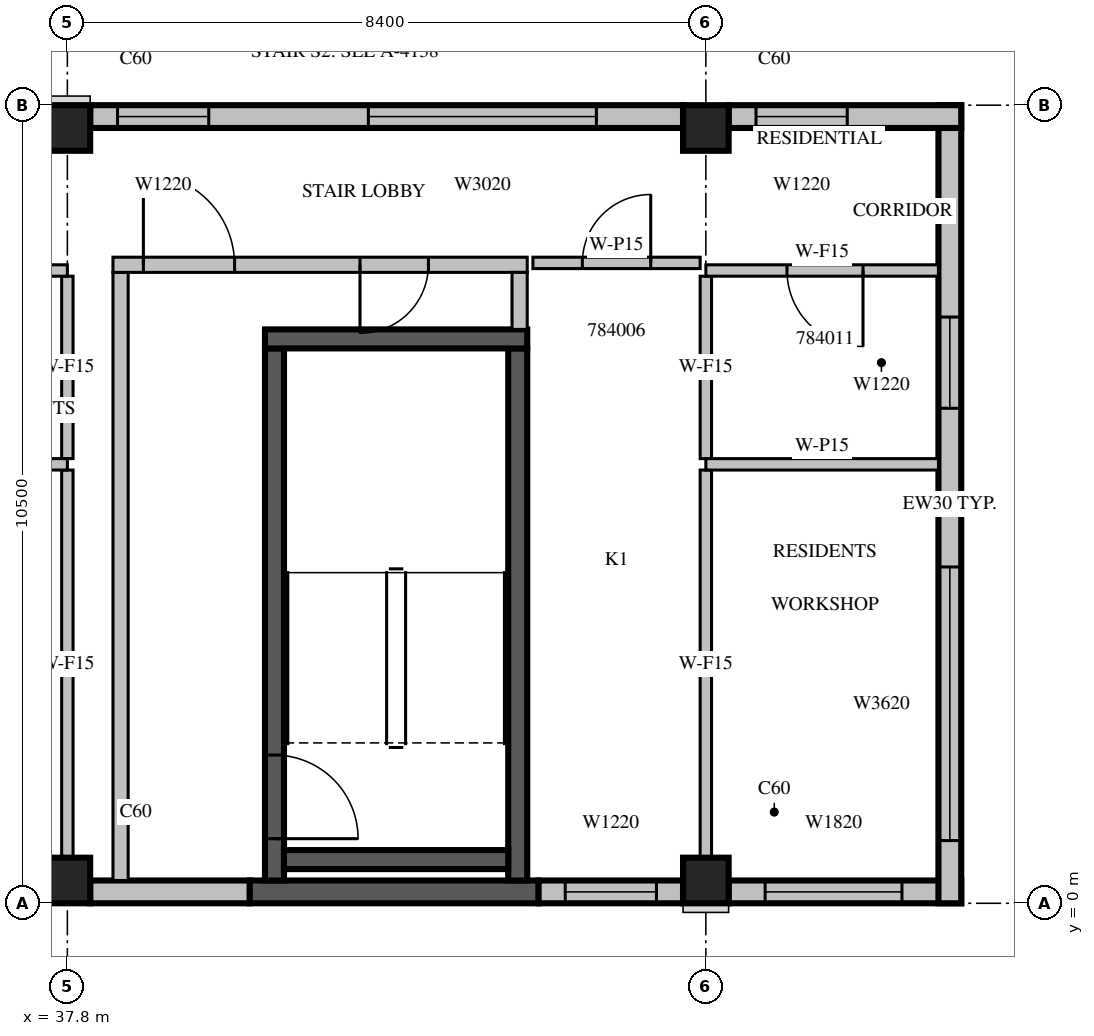
"""IFC4 building model, lengths in metres.
Left out: names, types, materials, properties, quantities, classifications, styles, units other than length and angle.
Written with IfcOpenShell. Run it as: python <this file> out.ifc"""

import sys

from ifc_helpers import new_model, si_unit, direction, frame, frame_2d, origin, origin_2d, place, context, subcontext, project, spatial, rectangle, extrude, source, transform, mapped, element, fill, save


model = new_model("IFC4")
c1 = context("Model", 3, precision=1e-05, world=origin(), true_north=direction((0.0, 1.0)))
c2 = subcontext(c1, "Body", "Model", "MODEL_VIEW")
j1 = project(units=[si_unit("LENGTHUNIT", "METRE"), si_unit("PLANEANGLEUNIT", "RADIAN")], contexts=[c1])
p1 = place(None, origin())
s1 = spatial("IfcSite", under=j1, at=p1, CompositionType="ELEMENT")
p2 = place(p1, origin())
s2 = spatial("IfcBuilding", under=s1, at=p2, CompositionType="ELEMENT")
p3 = place(p2, frame((0.0, 0.0, 354.5)))
s3 = spatial("IfcBuildingStorey", under=s2, at=p3, CompositionType="ELEMENT", Elevation=354.5)
m1 = source(origin(), c2, "Body", "SweptSolid", [
    extrude(rectangle(XDim=0.6, YDim=0.6, at=origin_2d()), origin(), (0.0, 0.0, 1.0), 3.5),
])
for number, where, z_axis, x_axis in (
    (1, (37.8, 0.3, 0.0), (0.0, 0.0, 1.0), (1.0, 0.0, 0.0)),
    (2, (46.2, 0.3, 0.0), (0.0, 0.0, 1.0), (1.0, 0.0, 0.0)),
    (3, (37.8, 10.2, 0.0), (0.0, 0.0, 1.0), (1.0, 0.0, 0.0)),
    (4, (46.2, 10.2, 0.0), (0.0, 0.0, 1.0), (1.0, 0.0, 0.0)),
):
    element("IfcColumn", number, at=place(p3, frame(where, z_axis=z_axis, x_axis=x_axis)), inside=s3, PredefinedType="COLUMN", context=c2, shape_type="MappedRepresentation", body=[
        mapped(m1, transform((0.0, 0.0, 0.0), scale=1.0)),
    ])
m2 = source(origin(), c2, "Body", "SweptSolid", [
    extrude(rectangle(XDim=2.1, YDim=0.3, at=frame_2d((1.05, 0.0))), origin(), (0.0, 0.0, 1.0), 3.1),
])
p4 = place(p3, frame((38.1, 0.15, 0.0), z_axis=(0.0, 0.0, 1.0), x_axis=(1.0, 0.0, 0.0)))
e5 = element("IfcWall", 5, at=p4, inside=s3, PredefinedType="STANDARD", context=c2, shape_type="MappedRepresentation", body=[
    mapped(m2, transform((0.0, 0.0, 0.0), scale=1.0)),
])
m3 = source(origin(), c2, "Body", "SweptSolid", [
    extrude(rectangle(XDim=3.8, YDim=0.3, at=frame_2d((1.9, 0.0))), origin(), (0.0, 0.0, 1.0), 3.1),
])
p5 = place(p3, frame((40.2, 0.15, 0.0), z_axis=(0.0, 0.0, 1.0), x_axis=(1.0, 0.0, 0.0)))
e6 = element("IfcWall", 6, at=p5, inside=s3, PredefinedType="SOLIDWALL", context=c2, shape_type="MappedRepresentation", body=[
    mapped(m3, transform((0.0, 0.0, 0.0), scale=1.0)),
])
m4 = source(origin(), c2, "Body", "SweptSolid", [
    extrude(rectangle(XDim=1.9, YDim=0.3, at=frame_2d((0.95, 0.0))), origin(), (0.0, 0.0, 1.0), 3.1),
])
p6 = place(p3, frame((44.0, 0.15, 0.0), z_axis=(0.0, 0.0, 1.0), x_axis=(1.0, 0.0, 0.0)))
e7 = element("IfcWall", 7, at=p6, inside=s3, PredefinedType="STANDARD", context=c2, shape_type="MappedRepresentation", body=[
    mapped(m4, transform((0.0, 0.0, 0.0), scale=1.0)),
])
m5 = source(origin(), c2, "Body", "SweptSolid", [
    extrude(rectangle(XDim=1.2, YDim=2.0, at=frame_2d((0.6, 1.0))), frame((0.0, 0.16, 0.0), z_axis=(0.0, -1.0, 0.0), x_axis=(1.0, 0.0, 0.0)), (0.0, 0.0, 1.0), 0.32),
])
p7 = place(p6, frame((0.35, 0.0, 0.6)))
e8 = element("IfcOpeningElement", 8, at=p7, cuts=e7, PredefinedType="OPENING", context=c2, shape_type="MappedRepresentation", body=[
    mapped(m5, transform((0.0, 0.0, 0.0), scale=1.0)),
])
m6 = source(origin(), c2, "Body", "SweptSolid", [
    extrude(rectangle(XDim=3.06, YDim=0.3, at=frame_2d((1.53, 0.0))), origin(), (0.0, 0.0, 1.0), 3.1),
])
p8 = place(p3, frame((46.5, 0.15, 0.0), z_axis=(0.0, 0.0, 1.0), x_axis=(1.0, 0.0, 0.0)))
e9 = element("IfcWall", 9, at=p8, inside=s3, PredefinedType="STANDARD", context=c2, shape_type="MappedRepresentation", body=[
    mapped(m6, transform((0.0, 0.0, 0.0), scale=1.0)),
])
m7 = source(origin(), c2, "Body", "SweptSolid", [
    extrude(rectangle(XDim=1.8, YDim=2.0, at=frame_2d((0.9, 1.0))), frame((0.0, 0.16, 0.0), z_axis=(0.0, -1.0, 0.0), x_axis=(1.0, 0.0, 0.0)), (0.0, 0.0, 1.0), 0.32),
])
p9 = place(p8, frame((0.48, 0.0, 0.6)))
e10 = element("IfcOpeningElement", 10, at=p9, cuts=e9, PredefinedType="OPENING", context=c2, shape_type="MappedRepresentation", body=[
    mapped(m7, transform((0.0, 0.0, 0.0), scale=1.0)),
])
m8 = source(origin(), c2, "Body", "SweptSolid", [
    extrude(rectangle(XDim=10.5, YDim=0.3, at=frame_2d((5.25, 0.0))), origin(), (0.0, 0.0, 1.0), 3.1),
])
p10 = place(p3, frame((49.41, 0.0, 0.0), z_axis=(0.0, 0.0, 1.0), x_axis=(0.0, 1.0, 0.0)))
e11 = element("IfcWall", 11, at=p10, inside=s3, PredefinedType="STANDARD", context=c2, shape_type="MappedRepresentation", body=[
    mapped(m8, transform((0.0, 0.0, 0.0), scale=1.0)),
])
m9 = source(origin(), c2, "Body", "SweptSolid", [
    extrude(rectangle(XDim=3.6, YDim=2.0, at=frame_2d((1.8, 1.0))), frame((0.0, 0.16, 0.0), z_axis=(0.0, -1.0, 0.0), x_axis=(1.0, 0.0, 0.0)), (0.0, 0.0, 1.0), 0.32),
])
p11 = place(p10, frame((0.825, 0.0, 0.6)))
e12 = element("IfcOpeningElement", 12, at=p11, cuts=e11, PredefinedType="OPENING", context=c2, shape_type="MappedRepresentation", body=[
    mapped(m9, transform((0.0, 0.0, 0.0), scale=1.0)),
])
p12 = place(p10, frame((6.513, 0.0, 0.6)))
e13 = element("IfcOpeningElement", 13, at=p12, cuts=e11, PredefinedType="OPENING", context=c2, shape_type="MappedRepresentation", body=[
    mapped(m5, transform((0.0, 0.0, 0.0), scale=1.0)),
])
p13 = place(p3, frame((49.56, 10.35, 0.0), z_axis=(0.0, 0.0, 1.0), x_axis=(-1.0, 0.0, 0.0)))
e14 = element("IfcWall", 14, at=p13, inside=s3, PredefinedType="STANDARD", context=c2, shape_type="MappedRepresentation", body=[
    mapped(m6, transform((0.0, 0.0, 0.0), scale=1.0)),
])
p14 = place(p13, frame((1.5, 0.0, 0.6)))
e15 = element("IfcOpeningElement", 15, at=p14, cuts=e14, PredefinedType="OPENING", context=c2, shape_type="MappedRepresentation", body=[
    mapped(m5, transform((0.0, 0.0, 0.0), scale=1.0)),
])
m10 = source(origin(), c2, "Body", "SweptSolid", [
    extrude(rectangle(XDim=7.8, YDim=0.3, at=frame_2d((3.9, 0.0))), origin(), (0.0, 0.0, 1.0), 3.1),
])
p15 = place(p3, frame((45.9, 10.35, 0.0), z_axis=(0.0, 0.0, 1.0), x_axis=(-1.0, 0.0, 0.0)))
e16 = element("IfcWall", 16, at=p15, inside=s3, PredefinedType="STANDARD", context=c2, shape_type="MappedRepresentation", body=[
    mapped(m10, transform((0.0, 0.0, 0.0), scale=1.0)),
])
m11 = source(origin(), c2, "Body", "SweptSolid", [
    extrude(rectangle(XDim=3.0, YDim=2.0, at=frame_2d((1.5, 1.0))), frame((0.0, 0.16, 0.0), z_axis=(0.0, -1.0, 0.0), x_axis=(1.0, 0.0, 0.0)), (0.0, 0.0, 1.0), 0.32),
])
p16 = place(p15, frame((1.14, 0.0, 0.6)))
e17 = element("IfcOpeningElement", 17, at=p16, cuts=e16, PredefinedType="OPENING", context=c2, shape_type="MappedRepresentation", body=[
    mapped(m11, transform((0.0, 0.0, 0.0), scale=1.0)),
])
p17 = place(p15, frame((6.24, 0.0, 0.6)))
e18 = element("IfcOpeningElement", 18, at=p17, cuts=e16, PredefinedType="OPENING", context=c2, shape_type="MappedRepresentation", body=[
    mapped(m5, transform((0.0, 0.0, 0.0), scale=1.0)),
])
m12 = source(origin(), c2, "Body", "SweptSolid", [
    extrude(rectangle(XDim=7.0, YDim=0.25, at=frame_2d((3.5, 0.0))), origin(), (0.0, 0.0, 1.0), 3.1),
])
p18 = place(p3, frame((40.525, 0.3, 0.0), z_axis=(0.0, 0.0, 1.0), x_axis=(0.0, 1.0, 0.0)))
e19 = element("IfcWall", 19, at=p18, inside=s3, PredefinedType="SOLIDWALL", context=c2, shape_type="MappedRepresentation", body=[
    mapped(m12, transform((0.0, 0.0, 0.0), scale=1.0)),
])
m13 = source(origin(), c2, "Body", "SweptSolid", [
    extrude(rectangle(XDim=1.1, YDim=2.1, at=frame_2d((0.55, 1.05))), frame((0.0, 0.135, 0.0), z_axis=(0.0, -1.0, 0.0), x_axis=(1.0, 0.0, 0.0)), (0.0, 0.0, 1.0), 0.27),
])
p19 = place(p18, frame((0.55, 0.0, 0.0)))
e20 = element("IfcOpeningElement", 20, at=p19, cuts=e19, PredefinedType="OPENING", context=c2, shape_type="MappedRepresentation", body=[
    mapped(m13, transform((0.0, 0.0, 0.0), scale=1.0)),
])
p20 = place(p3, frame((43.725, 0.3, 0.0), z_axis=(0.0, 0.0, 1.0), x_axis=(0.0, 1.0, 0.0)))
e21 = element("IfcWall", 21, at=p20, inside=s3, PredefinedType="SOLIDWALL", context=c2, shape_type="MappedRepresentation", body=[
    mapped(m12, transform((0.0, 0.0, 0.0), scale=1.0)),
])
m14 = source(origin(), c2, "Body", "SweptSolid", [
    extrude(rectangle(XDim=3.45, YDim=0.25, at=frame_2d((1.725, 0.0))), origin(), (0.0, 0.0, 1.0), 3.1),
])
p21 = place(p3, frame((40.4, 7.425, 0.0), z_axis=(0.0, 0.0, 1.0), x_axis=(1.0, 0.0, 0.0)))
e22 = element("IfcWall", 22, at=p21, inside=s3, PredefinedType="SOLIDWALL", context=c2, shape_type="MappedRepresentation", body=[
    mapped(m14, transform((0.0, 0.0, 0.0), scale=1.0)),
])
m15 = source(origin(), c2, "Body", "SweptSolid", [
    extrude(rectangle(XDim=2.95, YDim=0.25, at=frame_2d((1.475, 0.0))), origin(), (0.0, 0.0, 1.0), 3.1),
])
p22 = place(p3, frame((40.65, 0.575, 0.0), z_axis=(0.0, 0.0, 1.0), x_axis=(1.0, 0.0, 0.0)))
e23 = element("IfcWall", 23, at=p22, inside=s3, PredefinedType="SOLIDWALL", context=c2, shape_type="MappedRepresentation", body=[
    mapped(m15, transform((0.0, 0.0, 0.0), scale=1.0)),
])
m16 = source(origin(), c2, "Body", "SweptSolid", [
    extrude(rectangle(XDim=8.0, YDim=0.2, at=frame_2d((4.0, 0.0))), origin(), (0.0, 0.0, 1.0), 3.1),
])
p23 = place(p3, frame((38.5, 0.3, 0.0), z_axis=(0.0, 0.0, 1.0), x_axis=(0.0, 1.0, 0.0)))
e24 = element("IfcWall", 24, at=p23, inside=s3, PredefinedType="PARTITIONING", context=c2, shape_type="MappedRepresentation", body=[
    mapped(m16, transform((0.0, 0.0, 0.0), scale=1.0)),
])
m17 = source(origin(), c2, "Body", "SweptSolid", [
    extrude(rectangle(XDim=5.45, YDim=0.2, at=frame_2d((2.725, 0.0))), origin(), (0.0, 0.0, 1.0), 3.1),
])
p24 = place(p3, frame((38.4, 8.4, 0.0), z_axis=(0.0, 0.0, 1.0), x_axis=(1.0, 0.0, 0.0)))
e25 = element("IfcWall", 25, at=p24, inside=s3, PredefinedType="PARTITIONING", context=c2, shape_type="MappedRepresentation", body=[
    mapped(m17, transform((0.0, 0.0, 0.0), scale=1.0)),
])
m18 = source(origin(), c2, "Body", "SweptSolid", [
    extrude(rectangle(XDim=1.2, YDim=2.1, at=frame_2d((0.6, 1.05))), frame((0.0, 0.11, 0.0), z_axis=(0.0, -1.0, 0.0), x_axis=(1.0, 0.0, 0.0)), (0.0, 0.0, 1.0), 0.22),
])
p25 = place(p24, frame((0.4, 0.0, 0.0)))
e26 = element("IfcOpeningElement", 26, at=p25, cuts=e25, PredefinedType="OPENING", context=c2, shape_type="MappedRepresentation", body=[
    mapped(m18, transform((0.0, 0.0, 0.0), scale=1.0)),
])
m19 = source(origin(), c2, "Body", "SweptSolid", [
    extrude(rectangle(XDim=0.9, YDim=2.1, at=frame_2d((0.45, 1.05))), frame((0.0, 0.11, 0.0), z_axis=(0.0, -1.0, 0.0), x_axis=(1.0, 0.0, 0.0)), (0.0, 0.0, 1.0), 0.22),
])
p26 = place(p24, frame((3.25, 0.0, 0.0)))
e27 = element("IfcOpeningElement", 27, at=p26, cuts=e25, PredefinedType="OPENING", context=c2, shape_type="MappedRepresentation", body=[
    mapped(m19, transform((0.0, 0.0, 0.0), scale=1.0)),
])
m20 = source(origin(), c2, "Body", "SweptSolid", [
    extrude(rectangle(XDim=0.75, YDim=0.2, at=frame_2d((0.375, 0.0))), origin(), (0.0, 0.0, 1.0), 3.1),
])
p27 = place(p3, frame((43.75, 7.55, 0.0), z_axis=(0.0, 0.0, 1.0), x_axis=(0.0, 1.0, 0.0)))
e28 = element("IfcWall", 28, at=p27, inside=s3, PredefinedType="PARTITIONING", context=c2, shape_type="MappedRepresentation", body=[
    mapped(m20, transform((0.0, 0.0, 0.0), scale=1.0)),
])
m21 = source(origin(), c2, "Body", "SweptSolid", [
    extrude(rectangle(XDim=2.2, YDim=0.15, at=frame_2d((1.1, 0.0))), origin(), (0.0, 0.0, 1.0), 3.1),
])
p28 = place(p3, frame((46.125, 8.425, 0.0), z_axis=(0.0, 0.0, 1.0), x_axis=(-1.0, 0.0, 0.0)))
e29 = element("IfcWall", 29, at=p28, inside=s3, PredefinedType="PARTITIONING", context=c2, shape_type="MappedRepresentation", body=[
    mapped(m21, transform((0.0, 0.0, 0.0), scale=1.0)),
])
m22 = source(origin(), c2, "Body", "SweptSolid", [
    extrude(rectangle(XDim=0.9, YDim=2.1, at=frame_2d((0.45, 1.05))), frame((0.0, 0.085, 0.0), z_axis=(0.0, -1.0, 0.0), x_axis=(1.0, 0.0, 0.0)), (0.0, 0.0, 1.0), 0.17),
])
p29 = place(p28, frame((0.65, 0.0, 0.0)))
e30 = element("IfcOpeningElement", 30, at=p29, cuts=e29, PredefinedType="OPENING", context=c2, shape_type="MappedRepresentation", body=[
    mapped(m22, transform((0.0, 0.0, 0.0), scale=1.0)),
])
p30 = place(p3, frame((37.8, 0.599, 0.0), z_axis=(0.0, 0.0, 1.0), x_axis=(0.0, 1.0, 0.0)))
e31 = element("IfcWall", 31, at=p30, inside=s3, PredefinedType="PARTITIONING", context=c2, shape_type="SweptSolid", body=[
    extrude(rectangle(XDim=5.101, YDim=0.15, at=frame_2d((2.55, 0.0))), origin(), (0.0, 0.0, 1.0), 3.1),
])
m23 = source(origin(), c2, "Body", "SweptSolid", [
    extrude(rectangle(XDim=2.4, YDim=0.15, at=frame_2d((1.2, 0.0))), origin(), (0.0, 0.0, 1.0), 3.1),
])
p31 = place(p3, frame((37.8, 5.85, 0.0), z_axis=(0.0, 0.0, 1.0), x_axis=(0.0, 1.0, 0.0)))
e32 = element("IfcWall", 32, at=p31, inside=s3, PredefinedType="PARTITIONING", context=c2, shape_type="MappedRepresentation", body=[
    mapped(m23, transform((0.0, 0.0, 0.0), scale=1.0)),
])
m24 = source(origin(), c2, "Body", "SweptSolid", [
    extrude(rectangle(XDim=8.4, YDim=0.15, at=frame_2d((4.2, 0.0))), origin(), (0.0, 0.0, 1.0), 3.1),
])
p32 = place(p3, frame((37.8, 5.775, 0.0), z_axis=(0.0, 0.0, 1.0), x_axis=(-1.0, 0.0, 0.0)))
e33 = element("IfcWall", 33, at=p32, inside=s3, PredefinedType="PARTITIONING", context=c2, shape_type="MappedRepresentation", body=[
    mapped(m24, transform((0.0, 0.0, 0.0), scale=1.0)),
])
m25 = source(origin(), c2, "Body", "SweptSolid", [
    extrude(rectangle(XDim=1.2, YDim=2.1, at=frame_2d((0.6, 1.05))), frame((0.0, 0.085, 0.0), z_axis=(0.0, -1.0, 0.0), x_axis=(1.0, 0.0, 0.0)), (0.0, 0.0, 1.0), 0.17),
])
p33 = place(p32, frame((5.648, 0.0, 0.0)))
e34 = element("IfcOpeningElement", 34, at=p33, cuts=e33, PredefinedType="OPENING", context=c2, shape_type="MappedRepresentation", body=[
    mapped(m25, transform((0.0, 0.0, 0.0), scale=1.0)),
])
m26 = source(origin(), c2, "Body", "SweptSolid", [
    extrude(rectangle(XDim=5.101, YDim=0.15, at=frame_2d((2.55, 0.0))), origin(), (0.0, 0.0, 1.0), 3.1),
])
p34 = place(p3, frame((46.2, 0.599, 0.0), z_axis=(0.0, 0.0, 1.0), x_axis=(0.0, 1.0, 0.0)))
e35 = element("IfcWall", 35, at=p34, inside=s3, PredefinedType="PARTITIONING", context=c2, shape_type="MappedRepresentation", body=[
    mapped(m26, transform((0.0, 0.0, 0.0), scale=1.0)),
])
p35 = place(p3, frame((46.2, 5.85, 0.0), z_axis=(0.0, 0.0, 1.0), x_axis=(0.0, 1.0, 0.0)))
e36 = element("IfcWall", 36, at=p35, inside=s3, PredefinedType="PARTITIONING", context=c2, shape_type="MappedRepresentation", body=[
    mapped(m23, transform((0.0, 0.0, 0.0), scale=1.0)),
])
m27 = source(origin(), c2, "Body", "SweptSolid", [
    extrude(rectangle(XDim=3.06, YDim=0.15, at=frame_2d((1.53, 0.0))), origin(), (0.0, 0.0, 1.0), 3.1),
])
p36 = place(p3, frame((49.26, 5.775, 0.0), z_axis=(0.0, 0.0, 1.0), x_axis=(-1.0, 0.0, 0.0)))
e37 = element("IfcWall", 37, at=p36, inside=s3, PredefinedType="PARTITIONING", context=c2, shape_type="MappedRepresentation", body=[
    mapped(m27, transform((0.0, 0.0, 0.0), scale=1.0)),
])
p37 = place(p3, frame((37.8, 8.325, 0.0), z_axis=(0.0, 0.0, 1.0), x_axis=(-1.0, 0.0, 0.0)))
e38 = element("IfcWall", 38, at=p37, inside=s3, PredefinedType="PARTITIONING", context=c2, shape_type="MappedRepresentation", body=[
    mapped(m24, transform((0.0, 0.0, 0.0), scale=1.0)),
])
p38 = place(p37, frame((5.698, 0.0, 0.0)))
e39 = element("IfcOpeningElement", 39, at=p38, cuts=e38, PredefinedType="OPENING", context=c2, shape_type="MappedRepresentation", body=[
    mapped(m25, transform((0.0, 0.0, 0.0), scale=1.0)),
])
p39 = place(p37, frame((2.773, 0.0, 0.0)))
e40 = element("IfcOpeningElement", 40, at=p39, cuts=e38, PredefinedType="OPENING", context=c2, shape_type="MappedRepresentation", body=[
    mapped(m22, transform((0.0, 0.0, 0.0), scale=1.0)),
])
p40 = place(p37, frame((0.676, 0.0, 0.0)))
e41 = element("IfcOpeningElement", 41, at=p40, cuts=e38, PredefinedType="OPENING", context=c2, shape_type="MappedRepresentation", body=[
    mapped(m22, transform((0.0, 0.0, 0.0), scale=1.0)),
])
p41 = place(p3, frame((49.26, 8.325, 0.0), z_axis=(0.0, 0.0, 1.0), x_axis=(-1.0, 0.0, 0.0)))
e42 = element("IfcWall", 42, at=p41, inside=s3, PredefinedType="PARTITIONING", context=c2, shape_type="MappedRepresentation", body=[
    mapped(m27, transform((0.0, 0.0, 0.0), scale=1.0)),
])
m28 = source(origin(), c2, "Body", "SweptSolid", [
    extrude(rectangle(XDim=1.0, YDim=2.1, at=frame_2d((0.5, 1.05))), frame((0.0, 0.085, 0.0), z_axis=(0.0, -1.0, 0.0), x_axis=(1.0, 0.0, 0.0)), (0.0, 0.0, 1.0), 0.17),
])
p42 = place(p41, frame((0.993, 0.0, 0.0)))
e43 = element("IfcOpeningElement", 43, at=p42, cuts=e42, PredefinedType="OPENING", context=c2, shape_type="MappedRepresentation", body=[
    mapped(m28, transform((0.0, 0.0, 0.0), scale=1.0)),
])
m29 = source(origin(), c2, "Body", "SweptSolid", [
    extrude(rectangle(XDim=1.2, YDim=2.0, at=frame_2d((0.6, 1.0))), frame((0.0, 0.03, 0.0), z_axis=(0.0, -1.0, 0.0), x_axis=(1.0, 0.0, 0.0)), (0.0, 0.0, 1.0), 0.06),
])
p43 = place(p7, origin())
e44 = element("IfcWindow", 44, at=p43, inside=s3, PartitioningType="SINGLE_PANEL", PredefinedType="WINDOW", context=c2, shape_type="MappedRepresentation", body=[
    mapped(m29, transform((0.0, 0.0, 0.0), scale=1.0)),
])
fill(e8, e44)
m30 = source(origin(), c2, "Body", "SweptSolid", [
    extrude(rectangle(XDim=1.8, YDim=2.0, at=frame_2d((0.9, 1.0))), frame((0.0, 0.03, 0.0), z_axis=(0.0, -1.0, 0.0), x_axis=(1.0, 0.0, 0.0)), (0.0, 0.0, 1.0), 0.06),
])
p44 = place(p9, origin())
e45 = element("IfcWindow", 45, at=p44, inside=s3, PartitioningType="SINGLE_PANEL", PredefinedType="WINDOW", context=c2, shape_type="MappedRepresentation", body=[
    mapped(m30, transform((0.0, 0.0, 0.0), scale=1.0)),
])
fill(e10, e45)
m31 = source(origin(), c2, "Body", "SweptSolid", [
    extrude(rectangle(XDim=3.6, YDim=2.0, at=frame_2d((1.8, 1.0))), frame((0.0, 0.03, 0.0), z_axis=(0.0, -1.0, 0.0), x_axis=(1.0, 0.0, 0.0)), (0.0, 0.0, 1.0), 0.06),
])
p45 = place(p11, origin())
e46 = element("IfcWindow", 46, at=p45, inside=s3, PartitioningType="SINGLE_PANEL", PredefinedType="WINDOW", context=c2, shape_type="MappedRepresentation", body=[
    mapped(m31, transform((0.0, 0.0, 0.0), scale=1.0)),
])
fill(e12, e46)
p46 = place(p12, origin())
e47 = element("IfcWindow", 47, at=p46, inside=s3, PartitioningType="SINGLE_PANEL", PredefinedType="WINDOW", context=c2, shape_type="MappedRepresentation", body=[
    mapped(m29, transform((0.0, 0.0, 0.0), scale=1.0)),
])
fill(e13, e47)
p47 = place(p14, origin())
e48 = element("IfcWindow", 48, at=p47, inside=s3, PartitioningType="SINGLE_PANEL", PredefinedType="WINDOW", context=c2, shape_type="MappedRepresentation", body=[
    mapped(m29, transform((0.0, 0.0, 0.0), scale=1.0)),
])
fill(e15, e48)
m32 = source(origin(), c2, "Body", "SweptSolid", [
    extrude(rectangle(XDim=3.0, YDim=2.0, at=frame_2d((1.5, 1.0))), frame((0.0, 0.03, 0.0), z_axis=(0.0, -1.0, 0.0), x_axis=(1.0, 0.0, 0.0)), (0.0, 0.0, 1.0), 0.06),
])
p48 = place(p16, origin())
e49 = element("IfcWindow", 49, at=p48, inside=s3, PartitioningType="SINGLE_PANEL", PredefinedType="WINDOW", context=c2, shape_type="MappedRepresentation", body=[
    mapped(m32, transform((0.0, 0.0, 0.0), scale=1.0)),
])
fill(e17, e49)
p49 = place(p17, origin())
e50 = element("IfcWindow", 50, at=p49, inside=s3, PartitioningType="SINGLE_PANEL", PredefinedType="WINDOW", context=c2, shape_type="MappedRepresentation", body=[
    mapped(m29, transform((0.0, 0.0, 0.0), scale=1.0)),
])
fill(e18, e50)
m33 = source(origin(), c2, "Body", "SweptSolid", [
    extrude(rectangle(XDim=1.1, YDim=2.1, at=frame_2d((0.55, 1.05))), frame((0.0, 0.025, 0.0), z_axis=(0.0, -1.0, 0.0), x_axis=(1.0, 0.0, 0.0)), (0.0, 0.0, 1.0), 0.05),
])
p50 = place(p19, origin())
e51 = element("IfcDoor", 51, at=p50, inside=s3, OperationType="SINGLE_SWING_RIGHT", PredefinedType="DOOR", context=c2, shape_type="MappedRepresentation", body=[
    mapped(m33, transform((0.0, 0.0, 0.0), scale=1.0)),
])
fill(e20, e51)
m34 = source(origin(), c2, "Body", "SweptSolid", [
    extrude(rectangle(XDim=1.2, YDim=2.1, at=frame_2d((0.6, 1.05))), frame((0.0, 0.025, 0.0), z_axis=(0.0, -1.0, 0.0), x_axis=(1.0, 0.0, 0.0)), (0.0, 0.0, 1.0), 0.05),
])
p51 = place(p25, origin())
e52 = element("IfcDoor", 52, at=p51, inside=s3, OperationType="SINGLE_SWING_LEFT", PredefinedType="DOOR", context=c2, shape_type="MappedRepresentation", body=[
    mapped(m34, transform((0.0, 0.0, 0.0), scale=1.0)),
])
fill(e26, e52)
m35 = source(origin(), c2, "Body", "SweptSolid", [
    extrude(rectangle(XDim=0.9, YDim=2.1, at=frame_2d((0.45, 1.05))), frame((0.0, 0.025, 0.0), z_axis=(0.0, -1.0, 0.0), x_axis=(1.0, 0.0, 0.0)), (0.0, 0.0, 1.0), 0.05),
])
p52 = place(p26, origin())
e53 = element("IfcDoor", 53, at=p52, inside=s3, OperationType="SINGLE_SWING_RIGHT", PredefinedType="DOOR", context=c2, shape_type="MappedRepresentation", body=[
    mapped(m35, transform((0.0, 0.0, 0.0), scale=1.0)),
])
fill(e27, e53)
p53 = place(p29, origin())
e54 = element("IfcDoor", 54, at=p53, inside=s3, OperationType="SINGLE_SWING_RIGHT", PredefinedType="DOOR", context=c2, shape_type="MappedRepresentation", body=[
    mapped(m35, transform((0.0, 0.0, 0.0), scale=1.0)),
])
fill(e30, e54)
m36 = source(origin(), c2, "Body", "SweptSolid", [
    extrude(rectangle(XDim=1.0, YDim=2.1, at=frame_2d((0.5, 1.05))), frame((0.0, 0.025, 0.0), z_axis=(0.0, -1.0, 0.0), x_axis=(1.0, 0.0, 0.0)), (0.0, 0.0, 1.0), 0.05),
])
p54 = place(p42, origin())
e55 = element("IfcDoor", 55, at=p54, inside=s3, OperationType="SINGLE_SWING_LEFT", PredefinedType="DOOR", context=c2, shape_type="MappedRepresentation", body=[
    mapped(m36, transform((0.0, 0.0, 0.0), scale=1.0)),
])
fill(e43, e55)
save(model, sys.argv[1])
